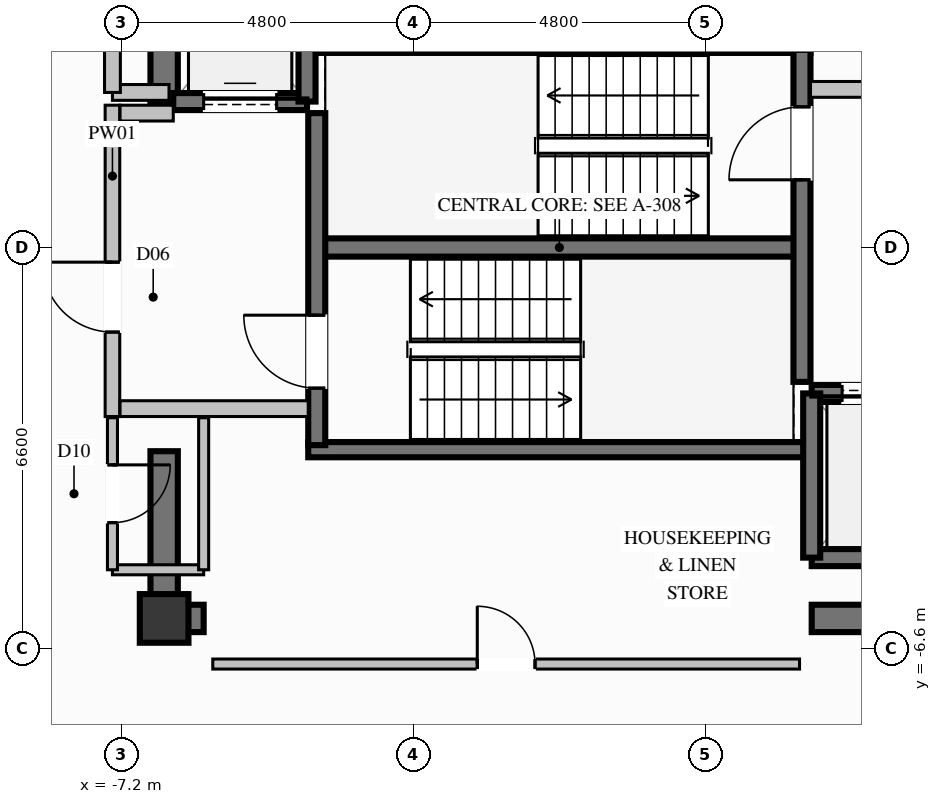
"""IFC4 building model, lengths in metres.
Left out: names, types, materials, properties, quantities, classifications, styles, units other than length and angle.
Written with IfcOpenShell. Run it as: python <this file> out.ifc"""

import sys

from ifc_helpers import new_model, si_unit, direction, frame, frame_2d, origin, origin_2d, place, context, subcontext, project, spatial, rectangle, extrude, element, fill, save


model = new_model("IFC4")
c1 = context("Model", 3, precision=1e-05, world=origin(), true_north=direction((0.0, 1.0)))
c2 = subcontext(c1, "Body", "Model", "MODEL_VIEW")
j1 = project(units=[si_unit("LENGTHUNIT", "METRE"), si_unit("PLANEANGLEUNIT", "RADIAN")], contexts=[c1])
p1 = place(None, origin())
s1 = spatial("IfcSite", under=j1, at=p1, CompositionType="ELEMENT")
p2 = place(p1, origin())
s2 = spatial("IfcBuilding", under=s1, at=p2, CompositionType="ELEMENT")
p3 = place(p2, frame((0.0, 0.0, 274.4)))
s3 = spatial("IfcBuildingStorey", under=s2, at=p3, CompositionType="ELEMENT", Elevation=274.4)
p4 = place(p3, frame((-6.5, -6.1, 0.0), z_axis=(0.0, 0.0, 1.0), x_axis=(1.0, 0.0, 0.0)))
e1 = element("IfcColumn", 1, at=p4, inside=s3, PredefinedType="COLUMN", context=c2, shape_type="SweptSolid", body=[
    extrude(rectangle(XDim=0.8, YDim=0.8, at=origin_2d()), origin(), (0.0, 0.0, 1.0), 3.8),
])
p5 = place(p3, frame((-3.99, 0.0, 0.0), z_axis=(0.0, 0.0, 1.0), x_axis=(1.0, 0.0, 0.0)))
e2 = element("IfcWall", 2, at=p5, inside=s3, PredefinedType="SHEAR", context=c2, shape_type="SweptSolid", body=[
    extrude(rectangle(XDim=7.98, YDim=0.3, at=frame_2d((3.99, 0.0))), origin(), (0.0, 0.0, 1.0), 3.8),
])
for number, where, z_axis, x_axis in (
    (3, (-4.13, -3.325, 0.0), (0.0, 0.0, 1.0), (1.0, 0.0, 0.0)),
    (4, (-4.13, 3.325, 0.0), (0.0, 0.0, 1.0), (1.0, 0.0, 0.0)),
):
    element("IfcWall", number, at=place(p3, frame(where, z_axis=z_axis, x_axis=x_axis)), inside=s3, PredefinedType="SOLIDWALL", context=c2, shape_type="SweptSolid", body=[
        extrude(rectangle(XDim=8.26, YDim=0.25, at=frame_2d((4.13, 0.0))), origin(), (0.0, 0.0, 1.0), 3.8),
    ])
p6 = place(p3, frame((-6.275, -6.1, 0.0), z_axis=(0.0, 0.0, 1.0), x_axis=(1.0, 0.0, 0.0)))
e5 = element("IfcWall", 5, at=p6, inside=s3, PredefinedType="SHEAR", context=c2, shape_type="SweptSolid", body=[
    extrude(rectangle(XDim=0.425, YDim=0.45, at=frame_2d((0.212, 0.0))), origin(), (0.0, 0.0, 1.0), 3.8),
])
p7 = place(p3, frame((4.15, -6.1, 0.0), z_axis=(0.0, 0.0, 1.0), x_axis=(1.0, 0.0, 0.0)))
e6 = element("IfcWall", 6, at=p7, inside=s3, PredefinedType="SHEAR", context=c2, shape_type="SweptSolid", body=[
    extrude(rectangle(XDim=2.125, YDim=0.45, at=frame_2d((1.062, 0.0))), origin(), (0.0, 0.0, 1.0), 3.8),
])
p8 = place(p3, frame((-6.5, 2.35, 0.0), z_axis=(0.0, 0.0, 1.0), x_axis=(0.0, 1.0, 0.0)))
e7 = element("IfcWall", 7, at=p8, inside=s3, PredefinedType="SHEAR", context=c2, shape_type="SweptSolid", body=[
    extrude(rectangle(XDim=3.975, YDim=0.45, at=frame_2d((1.987, 0.0))), origin(), (0.0, 0.0, 1.0), 3.8),
])
p9 = place(p3, frame((-6.5, -6.325, 0.0), z_axis=(0.0, 0.0, 1.0), x_axis=(0.0, 1.0, 0.0)))
e8 = element("IfcWall", 8, at=p9, inside=s3, PredefinedType="SHEAR", context=c2, shape_type="SweptSolid", body=[
    extrude(rectangle(XDim=2.975, YDim=0.45, at=frame_2d((1.487, 0.0))), origin(), (0.0, 0.0, 1.0), 3.8),
])
p10 = place(p3, frame((-6.35, 2.4, 0.0), z_axis=(0.0, 0.0, 1.0), x_axis=(1.0, 0.0, 0.0)))
e9 = element("IfcWall", 9, at=p10, inside=s3, PredefinedType="SOLIDWALL", context=c2, shape_type="SweptSolid", body=[
    extrude(rectangle(XDim=2.2, YDim=0.28, at=frame_2d((1.1, 0.0))), origin(), (0.0, 0.0, 1.0), 3.57),
])
p11 = place(p10, frame((0.5, 0.0, 0.0)))
e10 = element("IfcOpeningElement", 10, at=p11, cuts=e9, PredefinedType="OPENING", context=c2, shape_type="SweptSolid", body=[
    extrude(rectangle(XDim=1.2, YDim=2.2, at=frame_2d((0.6, 1.1))), frame((0.0, 0.15, 0.0), z_axis=(0.0, -1.0, 0.0), x_axis=(1.0, 0.0, 0.0)), (0.0, 0.0, 1.0), 0.3),
])
p12 = place(p3, frame((-4.15, 2.4, 0.0), z_axis=(0.0, 0.0, 1.0), x_axis=(0.0, 1.0, 0.0)))
e11 = element("IfcWall", 11, at=p12, inside=s3, PredefinedType="SOLIDWALL", context=c2, shape_type="SweptSolid", body=[
    extrude(rectangle(XDim=2.7, YDim=0.28, at=frame_2d((1.35, 0.0))), origin(), (0.0, 0.0, 1.0), 3.57),
])
p13 = place(p3, frame((4.15, -5.1, 0.0), z_axis=(0.0, 0.0, 1.0), x_axis=(1.0, 0.0, 0.0)))
e12 = element("IfcWall", 12, at=p13, inside=s3, PredefinedType="SOLIDWALL", context=c2, shape_type="SweptSolid", body=[
    extrude(rectangle(XDim=2.2, YDim=0.28, at=frame_2d((1.1, 0.0))), origin(), (0.0, 0.0, 1.0), 3.57),
])
p14 = place(p3, frame((6.35, -2.4, 0.0), z_axis=(0.0, 0.0, 1.0), x_axis=(-1.0, 0.0, 0.0)))
e13 = element("IfcWall", 13, at=p14, inside=s3, PredefinedType="SOLIDWALL", context=c2, shape_type="SweptSolid", body=[
    extrude(rectangle(XDim=2.2, YDim=0.28, at=frame_2d((1.1, 0.0))), origin(), (0.0, 0.0, 1.0), 3.57),
])
p15 = place(p14, frame((0.5, 0.0, 0.0)))
e14 = element("IfcOpeningElement", 14, at=p15, cuts=e13, PredefinedType="OPENING", context=c2, shape_type="SweptSolid", body=[
    extrude(rectangle(XDim=1.2, YDim=2.2, at=frame_2d((0.6, 1.1))), frame((0.0, 0.15, 0.0), z_axis=(0.0, -1.0, 0.0), x_axis=(1.0, 0.0, 0.0)), (0.0, 0.0, 1.0), 0.3),
])
p16 = place(p3, frame((4.15, -2.4, 0.0), z_axis=(0.0, 0.0, 1.0), x_axis=(0.0, -1.0, 0.0)))
e15 = element("IfcWall", 15, at=p16, inside=s3, PredefinedType="SOLIDWALL", context=c2, shape_type="SweptSolid", body=[
    extrude(rectangle(XDim=2.7, YDim=0.28, at=frame_2d((1.35, 0.0))), origin(), (0.0, 0.0, 1.0), 3.57),
])
p17 = place(p3, frame((-3.99, -3.25, 0.0), z_axis=(0.0, 0.0, 1.0), x_axis=(0.0, 1.0, 0.0)))
e16 = element("IfcWall", 16, at=p17, inside=s3, PredefinedType="SOLIDWALL", context=c2, shape_type="SweptSolid", body=[
    extrude(rectangle(XDim=5.46, YDim=0.28, at=frame_2d((2.73, 0.0))), origin(), (0.0, 0.0, 1.0), 3.57),
])
p18 = place(p17, frame((0.937, 0.0, 0.0)))
e17 = element("IfcOpeningElement", 17, at=p18, cuts=e16, PredefinedType="OPENING", context=c2, shape_type="SweptSolid", body=[
    extrude(rectangle(XDim=1.2, YDim=2.2, at=frame_2d((0.6, 1.1))), frame((0.0, 0.15, 0.0), z_axis=(0.0, -1.0, 0.0), x_axis=(1.0, 0.0, 0.0)), (0.0, 0.0, 1.0), 0.3),
])
p19 = place(p3, frame((3.99, -2.21, 0.0), z_axis=(0.0, 0.0, 1.0), x_axis=(0.0, 1.0, 0.0)))
e18 = element("IfcWall", 18, at=p19, inside=s3, PredefinedType="SOLIDWALL", context=c2, shape_type="SweptSolid", body=[
    extrude(rectangle(XDim=5.46, YDim=0.28, at=frame_2d((2.73, 0.0))), origin(), (0.0, 0.0, 1.0), 3.57),
])
p20 = place(p19, frame((3.323, 0.0, 0.0)))
e19 = element("IfcOpeningElement", 19, at=p20, cuts=e18, PredefinedType="OPENING", context=c2, shape_type="SweptSolid", body=[
    extrude(rectangle(XDim=1.2, YDim=2.2, at=frame_2d((0.6, 1.1))), frame((0.0, 0.15, 0.0), z_axis=(0.0, -1.0, 0.0), x_axis=(1.0, 0.0, 0.0)), (0.0, 0.0, 1.0), 0.3),
])
p21 = place(p3, frame((-7.35, -2.78, 0.0), z_axis=(0.0, 0.0, 1.0), x_axis=(0.0, 1.0, 0.0)))
e20 = element("IfcWall", 20, at=p21, inside=s3, PredefinedType="PARTITIONING", context=c2, shape_type="SweptSolid", body=[
    extrude(rectangle(XDim=5.12, YDim=0.24, at=frame_2d((2.56, 0.0))), origin(), (0.0, 0.0, 1.0), 2.655),
])
p22 = place(p21, frame((1.389, 0.0, 0.0)))
e21 = element("IfcOpeningElement", 21, at=p22, cuts=e20, PredefinedType="OPENING", context=c2, shape_type="SweptSolid", body=[
    extrude(rectangle(XDim=1.15, YDim=2.2, at=frame_2d((0.575, 1.1))), frame((0.0, 0.13, 0.0), z_axis=(0.0, -1.0, 0.0), x_axis=(1.0, 0.0, 0.0)), (0.0, 0.0, 1.0), 0.26),
])
p23 = place(p3, frame((-7.225, -2.65, 0.0), z_axis=(0.0, 0.0, 1.0), x_axis=(1.0, 0.0, 0.0)))
e22 = element("IfcWall", 22, at=p23, inside=s3, PredefinedType="PARTITIONING", context=c2, shape_type="SweptSolid", body=[
    extrude(rectangle(XDim=3.095, YDim=0.26, at=frame_2d((1.548, 0.0))), origin(), (0.0, 0.0, 1.0), 3.57),
])
p24 = place(p3, frame((-7.225, 2.21, 0.0), z_axis=(0.0, 0.0, 1.0), x_axis=(1.0, 0.0, 0.0)))
e23 = element("IfcWall", 23, at=p24, inside=s3, PredefinedType="PARTITIONING", context=c2, shape_type="SweptSolid", body=[
    extrude(rectangle(XDim=0.875, YDim=0.26, at=frame_2d((0.438, 0.0))), origin(), (0.0, 0.0, 1.0), 3.57),
])
p25 = place(p3, frame((4.13, 2.6, 0.0), z_axis=(0.0, 0.0, 1.0), x_axis=(1.0, 0.0, 0.0)))
e24 = element("IfcWall", 24, at=p25, inside=s3, PredefinedType="PARTITIONING", context=c2, shape_type="SweptSolid", body=[
    extrude(rectangle(XDim=3.095, YDim=0.26, at=frame_2d((1.548, 0.0))), origin(), (0.0, 0.0, 1.0), 3.57),
])
p26 = place(p3, frame((-7.35, 2.55, 0.0), z_axis=(0.0, 0.0, 1.0), x_axis=(1.0, 0.0, 0.0)))
e25 = element("IfcWall", 25, at=p26, inside=s3, PredefinedType="PARTITIONING", context=c2, shape_type="SweptSolid", body=[
    extrude(rectangle(XDim=0.93, YDim=0.26, at=frame_2d((0.465, 0.0))), origin(), (0.0, 0.0, 1.0), 3.57),
])
p27 = place(p3, frame((-7.35, 2.55, 0.0), z_axis=(0.0, 0.0, 1.0), x_axis=(0.0, 1.0, 0.0)))
e26 = element("IfcWall", 26, at=p27, inside=s3, PredefinedType="PARTITIONING", context=c2, shape_type="SweptSolid", body=[
    extrude(rectangle(XDim=2.4, YDim=0.26, at=frame_2d((1.2, 0.0))), origin(), (0.0, 0.0, 1.0), 2.655),
])
p28 = place(p27, frame((0.775, 0.0, 0.0)))
e27 = element("IfcOpeningElement", 27, at=p28, cuts=e26, PredefinedType="OPENING", context=c2, shape_type="SweptSolid", body=[
    extrude(rectangle(XDim=0.85, YDim=2.05, at=frame_2d((0.425, 1.025))), frame((0.0, 0.14, 0.0), z_axis=(0.0, -1.0, 0.0), x_axis=(1.0, 0.0, 0.0)), (0.0, 0.0, 1.0), 0.28),
])
p29 = place(p3, frame((-7.35, -5.3, 0.0), z_axis=(0.0, 0.0, 1.0), x_axis=(1.0, 0.0, 0.0)))
e28 = element("IfcWall", 28, at=p29, inside=s3, PredefinedType="PARTITIONING", context=c2, shape_type="SweptSolid", body=[
    extrude(rectangle(XDim=1.5, YDim=0.165, at=frame_2d((0.75, 0.0))), origin(), (0.0, 0.0, 1.0), 2.655),
])
p30 = place(p3, frame((-5.85, -5.3, 0.0), z_axis=(0.0, 0.0, 1.0), x_axis=(0.0, 1.0, 0.0)))
e29 = element("IfcWall", 29, at=p30, inside=s3, PredefinedType="PARTITIONING", context=c2, shape_type="SweptSolid", body=[
    extrude(rectangle(XDim=2.5, YDim=0.165, at=frame_2d((1.25, 0.0))), origin(), (0.0, 0.0, 1.0), 2.655),
])
p31 = place(p3, frame((-7.35, -2.8, 0.0), z_axis=(0.0, 0.0, 1.0), x_axis=(0.0, -1.0, 0.0)))
e30 = element("IfcWall", 30, at=p31, inside=s3, PredefinedType="PARTITIONING", context=c2, shape_type="SweptSolid", body=[
    extrude(rectangle(XDim=2.5, YDim=0.165, at=frame_2d((1.25, 0.0))), origin(), (0.0, 0.0, 1.0), 3.57),
])
p32 = place(p31, frame((0.775, 0.0, 0.0)))
e31 = element("IfcOpeningElement", 31, at=p32, cuts=e30, PredefinedType="OPENING", context=c2, shape_type="SweptSolid", body=[
    extrude(rectangle(XDim=0.95, YDim=2.1, at=frame_2d((0.475, 1.05))), frame((0.0, 0.093, 0.0), z_axis=(0.0, -1.0, 0.0), x_axis=(1.0, 0.0, 0.0)), (0.0, 0.0, 1.0), 0.185),
])
p33 = place(p3, frame((-5.7, -6.85, 0.0), z_axis=(0.0, 0.0, 1.0), x_axis=(1.0, 0.0, 0.0)))
e32 = element("IfcWall", 32, at=p33, inside=s3, PredefinedType="PARTITIONING", context=c2, shape_type="SweptSolid", body=[
    extrude(rectangle(XDim=9.65, YDim=0.165, at=frame_2d((4.825, 0.0))), origin(), (0.0, 0.0, 1.0), 2.655),
])
p34 = place(p33, frame((4.35, 0.0, 0.0)))
e33 = element("IfcOpeningElement", 33, at=p34, cuts=e32, PredefinedType="OPENING", context=c2, shape_type="SweptSolid", body=[
    extrude(rectangle(XDim=0.95, YDim=2.1, at=frame_2d((0.475, 1.05))), frame((0.0, 0.093, 0.0), z_axis=(0.0, -1.0, 0.0), x_axis=(1.0, 0.0, 0.0)), (0.0, 0.0, 1.0), 0.185),
])
p35 = place(p11, origin())
e34 = element("IfcDoor", 34, at=p35, inside=s3, OperationType="SLIDING_TO_LEFT", PredefinedType="DOOR", context=c2, shape_type="SweptSolid", body=[
    extrude(rectangle(XDim=1.2, YDim=2.2, at=frame_2d((0.6, 1.1))), frame((0.0, 0.025, 0.0), z_axis=(0.0, -1.0, 0.0), x_axis=(1.0, 0.0, 0.0)), (0.0, 0.0, 1.0), 0.05),
])
fill(e10, e34)
p36 = place(p15, origin())
e35 = element("IfcDoor", 35, at=p36, inside=s3, OperationType="SLIDING_TO_LEFT", PredefinedType="DOOR", context=c2, shape_type="SweptSolid", body=[
    extrude(rectangle(XDim=1.2, YDim=2.2, at=frame_2d((0.6, 1.1))), frame((0.0, 0.025, 0.0), z_axis=(0.0, -1.0, 0.0), x_axis=(1.0, 0.0, 0.0)), (0.0, 0.0, 1.0), 0.05),
])
fill(e14, e35)
p37 = place(p18, origin())
e36 = element("IfcDoor", 36, at=p37, inside=s3, OperationType="SINGLE_SWING_RIGHT", PredefinedType="DOOR", context=c2, shape_type="SweptSolid", body=[
    extrude(rectangle(XDim=1.2, YDim=2.2, at=frame_2d((0.6, 1.1))), frame((0.0, 0.025, 0.0), z_axis=(0.0, -1.0, 0.0), x_axis=(1.0, 0.0, 0.0)), (0.0, 0.0, 1.0), 0.05),
])
fill(e17, e36)
p38 = place(p20, origin())
e37 = element("IfcDoor", 37, at=p38, inside=s3, OperationType="SINGLE_SWING_LEFT", PredefinedType="DOOR", context=c2, shape_type="SweptSolid", body=[
    extrude(rectangle(XDim=1.2, YDim=2.2, at=frame_2d((0.6, 1.1))), frame((0.0, 0.025, 0.0), z_axis=(0.0, -1.0, 0.0), x_axis=(1.0, 0.0, 0.0)), (0.0, 0.0, 1.0), 0.05),
])
fill(e19, e37)
p39 = place(p22, origin())
e38 = element("IfcDoor", 38, at=p39, inside=s3, OperationType="SINGLE_SWING_RIGHT", PredefinedType="DOOR", context=c2, shape_type="SweptSolid", body=[
    extrude(rectangle(XDim=1.15, YDim=2.2, at=frame_2d((0.575, 1.1))), frame((0.0, 0.025, 0.0), z_axis=(0.0, -1.0, 0.0), x_axis=(1.0, 0.0, 0.0)), (0.0, 0.0, 1.0), 0.05),
])
fill(e21, e38)
p40 = place(p32, origin())
e39 = element("IfcDoor", 39, at=p40, inside=s3, OperationType="SINGLE_SWING_LEFT", PredefinedType="DOOR", context=c2, shape_type="SweptSolid", body=[
    extrude(rectangle(XDim=0.95, YDim=2.1, at=frame_2d((0.475, 1.05))), frame((0.0, 0.025, 0.0), z_axis=(0.0, -1.0, 0.0), x_axis=(1.0, 0.0, 0.0)), (0.0, 0.0, 1.0), 0.05),
])
fill(e31, e39)
p41 = place(p34, origin())
e40 = element("IfcDoor", 40, at=p41, inside=s3, OperationType="SINGLE_SWING_LEFT", PredefinedType="DOOR", context=c2, shape_type="SweptSolid", body=[
    extrude(rectangle(XDim=0.95, YDim=2.1, at=frame_2d((0.475, 1.05))), frame((0.0, 0.025, 0.0), z_axis=(0.0, -1.0, 0.0), x_axis=(1.0, 0.0, 0.0)), (0.0, 0.0, 1.0), 0.05),
])
fill(e33, e40)
save(model, sys.argv[1])
